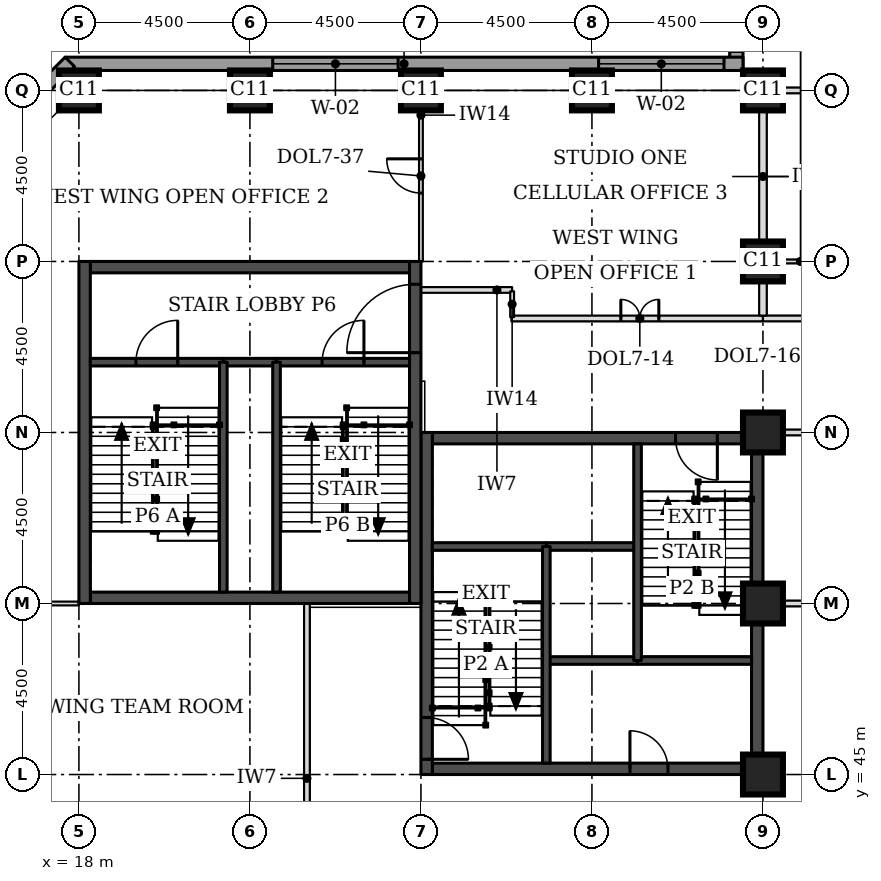
"""IFC4 building model, lengths in metres.
Left out: names, types, materials, properties, quantities, classifications, styles, units other than length and angle.
Written with IfcOpenShell. Run it as: python <this file> out.ifc"""

import sys

from ifc_helpers import new_model, si_unit, direction, frame, frame_2d, origin, origin_2d, place, context, subcontext, project, spatial, rectangle, extrude, element, fill, save


model = new_model("IFC4")
c1 = context("Model", 3, precision=1e-05, world=origin(), true_north=direction((0.0, 1.0)))
c2 = subcontext(c1, "Body", "Model", "MODEL_VIEW")
j1 = project(units=[si_unit("LENGTHUNIT", "METRE"), si_unit("PLANEANGLEUNIT", "RADIAN")], contexts=[c1])
p1 = place(None, origin())
s1 = spatial("IfcSite", under=j1, at=p1, CompositionType="ELEMENT")
p2 = place(p1, origin())
s2 = spatial("IfcBuilding", under=s1, at=p2, CompositionType="ELEMENT")
p3 = place(p2, frame((0.0, 0.0, 127.0)))
s3 = spatial("IfcBuildingStorey", under=s2, at=p3, CompositionType="ELEMENT", Elevation=127.0)
for number, where, z_axis, x_axis in (
    (1, (36.0, 45.0, 0.0), (0.0, 0.0, 1.0), (1.0, 0.0, 0.0)),
    (2, (36.0, 49.5, 0.0), (0.0, 0.0, 1.0), (1.0, 0.0, 0.0)),
    (3, (36.0, 54.0, 0.0), (0.0, 0.0, 1.0), (1.0, 0.0, 0.0)),
    (4, (36.0, 58.5, 0.0), (0.0, 0.0, 1.0), (1.0, 0.0, 0.0)),
    (5, (18.0, 63.0, 0.0), (0.0, 0.0, 1.0), (1.0, 0.0, 0.0)),
    (6, (22.5, 63.0, 0.0), (0.0, 0.0, 1.0), (1.0, 0.0, 0.0)),
    (7, (27.0, 63.0, 0.0), (0.0, 0.0, 1.0), (1.0, 0.0, 0.0)),
    (8, (31.5, 63.0, 0.0), (0.0, 0.0, 1.0), (1.0, 0.0, 0.0)),
    (9, (36.0, 63.0, 0.0), (0.0, 0.0, 1.0), (1.0, 0.0, 0.0)),
):
    element("IfcColumn", number, at=place(p3, frame(where, z_axis=z_axis, x_axis=x_axis)), inside=s3, PredefinedType="COLUMN", context=c2, shape_type="SweptSolid", body=[
        extrude(rectangle(XDim=1.05, YDim=1.05, at=origin_2d()), origin(), (0.0, 0.0, 1.0), 3.7),
    ])
p4 = place(p3, frame((27.3, 45.15, 0.0), z_axis=(0.0, 0.0, 1.0), x_axis=(1.0, 0.0, 0.0)))
e10 = element("IfcWall", 10, at=p4, inside=s3, PredefinedType="SHEAR", context=c2, shape_type="SweptSolid", body=[
    extrude(rectangle(XDim=8.4, YDim=0.3, at=frame_2d((4.2, 0.0))), origin(), (0.0, 0.0, 1.0), 3.7),
])
p5 = place(p4, frame((5.2, 0.0, 0.0)))
e11 = element("IfcOpeningElement", 11, at=p5, cuts=e10, PredefinedType="OPENING", context=c2, shape_type="SweptSolid", body=[
    extrude(rectangle(XDim=1.0, YDim=2.1, at=frame_2d((0.5, 1.05))), frame((0.0, 0.16, 0.0), z_axis=(0.0, -1.0, 0.0), x_axis=(1.0, 0.0, 0.0)), (0.0, 0.0, 1.0), 0.32),
])
p6 = place(p3, frame((27.3, 53.85, 0.0), z_axis=(0.0, 0.0, 1.0), x_axis=(1.0, 0.0, 0.0)))
e12 = element("IfcWall", 12, at=p6, inside=s3, PredefinedType="SHEAR", context=c2, shape_type="SweptSolid", body=[
    extrude(rectangle(XDim=8.4, YDim=0.3, at=frame_2d((4.2, 0.0))), origin(), (0.0, 0.0, 1.0), 3.7),
])
p7 = place(p6, frame((6.4, 0.0, 0.0)))
e13 = element("IfcOpeningElement", 13, at=p7, cuts=e12, PredefinedType="OPENING", context=c2, shape_type="SweptSolid", body=[
    extrude(rectangle(XDim=1.1, YDim=2.1, at=frame_2d((0.55, 1.05))), frame((0.0, 0.16, 0.0), z_axis=(0.0, -1.0, 0.0), x_axis=(1.0, 0.0, 0.0)), (0.0, 0.0, 1.0), 0.32),
])
p8 = place(p3, frame((27.15, 45.0, 0.0), z_axis=(0.0, 0.0, 1.0), x_axis=(0.0, 1.0, 0.0)))
e14 = element("IfcWall", 14, at=p8, inside=s3, PredefinedType="SHEAR", context=c2, shape_type="SweptSolid", body=[
    extrude(rectangle(XDim=9.0, YDim=0.3, at=frame_2d((4.5, 0.0))), origin(), (0.0, 0.0, 1.0), 3.7),
])
p9 = place(p8, frame((0.4, 0.0, 0.0)))
e15 = element("IfcOpeningElement", 15, at=p9, cuts=e14, PredefinedType="OPENING", context=c2, shape_type="SweptSolid", body=[
    extrude(rectangle(XDim=1.1, YDim=2.1, at=frame_2d((0.55, 1.05))), frame((0.0, 0.16, 0.0), z_axis=(0.0, -1.0, 0.0), x_axis=(1.0, 0.0, 0.0)), (0.0, 0.0, 1.0), 0.32),
])
p10 = place(p3, frame((35.85, 45.0, 0.0), z_axis=(0.0, 0.0, 1.0), x_axis=(0.0, 1.0, 0.0)))
e16 = element("IfcWall", 16, at=p10, inside=s3, PredefinedType="SHEAR", context=c2, shape_type="SweptSolid", body=[
    extrude(rectangle(XDim=9.0, YDim=0.3, at=frame_2d((4.5, 0.0))), origin(), (0.0, 0.0, 1.0), 3.7),
])
for number, where, z_axis, x_axis in (
    (17, (18.3, 49.65, 0.0), (0.0, 0.0, 1.0), (1.0, 0.0, 0.0)),
    (18, (18.3, 58.35, 0.0), (0.0, 0.0, 1.0), (1.0, 0.0, 0.0)),
):
    element("IfcWall", number, at=place(p3, frame(where, z_axis=z_axis, x_axis=x_axis)), inside=s3, PredefinedType="SHEAR", context=c2, shape_type="SweptSolid", body=[
        extrude(rectangle(XDim=8.4, YDim=0.3, at=frame_2d((4.2, 0.0))), origin(), (0.0, 0.0, 1.0), 3.7),
    ])
p11 = place(p3, frame((18.15, 49.5, 0.0), z_axis=(0.0, 0.0, 1.0), x_axis=(0.0, 1.0, 0.0)))
e19 = element("IfcWall", 19, at=p11, inside=s3, PredefinedType="SHEAR", context=c2, shape_type="SweptSolid", body=[
    extrude(rectangle(XDim=9.0, YDim=0.3, at=frame_2d((4.5, 0.0))), origin(), (0.0, 0.0, 1.0), 3.7),
])
p12 = place(p3, frame((26.85, 49.5, 0.0), z_axis=(0.0, 0.0, 1.0), x_axis=(0.0, 1.0, 0.0)))
e20 = element("IfcWall", 20, at=p12, inside=s3, PredefinedType="SHEAR", context=c2, shape_type="SweptSolid", body=[
    extrude(rectangle(XDim=9.0, YDim=0.3, at=frame_2d((4.5, 0.0))), origin(), (0.0, 0.0, 1.0), 3.7),
])
p13 = place(p12, frame((6.6, 0.0, 0.0)))
e21 = element("IfcOpeningElement", 21, at=p13, cuts=e20, PredefinedType="OPENING", context=c2, shape_type="SweptSolid", body=[
    extrude(rectangle(XDim=1.8, YDim=2.1, at=frame_2d((0.9, 1.05))), frame((0.0, 0.16, 0.0), z_axis=(0.0, -1.0, 0.0), x_axis=(1.0, 0.0, 0.0)), (0.0, 0.0, 1.0), 0.32),
])
p14 = place(p3, frame((35.3, 76.862, 0.0), z_axis=(0.0, 0.0, 1.0), x_axis=(0.0, -1.0, 0.0)))
e22 = element("IfcWall", 22, at=p14, inside=s3, PredefinedType="STANDARD", context=c2, shape_type="SweptSolid", body=[
    extrude(rectangle(XDim=13.337, YDim=0.35, at=frame_2d((6.669, 0.0))), origin(), (0.0, 0.0, 1.0), 3.525),
])
p15 = place(p14, frame((9.537, 0.0, 0.9)))
e23 = element("IfcOpeningElement", 23, at=p15, cuts=e22, PredefinedType="OPENING", context=c2, shape_type="SweptSolid", body=[
    extrude(rectangle(XDim=3.3, YDim=1.9, at=frame_2d((1.65, 0.95))), frame((0.0, 0.185, 0.0), z_axis=(0.0, -1.0, 0.0), x_axis=(1.0, 0.0, 0.0)), (0.0, 0.0, 1.0), 0.37),
])
p16 = place(p3, frame((35.475, 63.7, 0.0), z_axis=(0.0, 0.0, 1.0), x_axis=(-1.0, 0.0, 0.0)))
e24 = element("IfcWall", 24, at=p16, inside=s3, PredefinedType="STANDARD", context=c2, shape_type="SweptSolid", body=[
    extrude(rectangle(XDim=17.837, YDim=0.35, at=frame_2d((8.919, 0.0))), origin(), (0.0, 0.0, 1.0), 3.525),
])
p17 = place(p16, frame((0.5, 0.0, 0.9)))
e25 = element("IfcOpeningElement", 25, at=p17, cuts=e24, PredefinedType="OPENING", context=c2, shape_type="SweptSolid", body=[
    extrude(rectangle(XDim=3.3, YDim=1.9, at=frame_2d((1.65, 0.95))), frame((0.0, 0.185, 0.0), z_axis=(0.0, -1.0, 0.0), x_axis=(1.0, 0.0, 0.0)), (0.0, 0.0, 1.0), 0.37),
])
p18 = place(p16, frame((9.075, 0.0, 0.9)))
e26 = element("IfcOpeningElement", 26, at=p18, cuts=e24, PredefinedType="OPENING", context=c2, shape_type="SweptSolid", body=[
    extrude(rectangle(XDim=3.3, YDim=1.9, at=frame_2d((1.65, 0.95))), frame((0.0, 0.185, 0.0), z_axis=(0.0, -1.0, 0.0), x_axis=(1.0, 0.0, 0.0)), (0.0, 0.0, 1.0), 0.37),
])
p19 = place(p3, frame((17.761, 63.751, 0.0), z_axis=(0.0, 0.0, 1.0), x_axis=(-0.707106781187, -0.707106781187, 0.0)))
e27 = element("IfcWall", 27, at=p19, inside=s3, PredefinedType="STANDARD", context=c2, shape_type="SweptSolid", body=[
    extrude(rectangle(XDim=7.089, YDim=0.35, at=frame_2d((3.544, 0.0))), origin(), (0.0, 0.0, 1.0), 3.525),
])
p20 = place(p19, frame((1.894, 0.0, 0.9)))
e28 = element("IfcOpeningElement", 28, at=p20, cuts=e27, PredefinedType="OPENING", context=c2, shape_type="SweptSolid", body=[
    extrude(rectangle(XDim=3.3, YDim=1.9, at=frame_2d((1.65, 0.95))), frame((0.0, 0.185, 0.0), z_axis=(0.0, -1.0, 0.0), x_axis=(1.0, 0.0, 0.0)), (0.0, 0.0, 1.0), 0.37),
])
p21 = place(p3, frame((12.749, 44.761, 0.0), z_axis=(0.0, 0.0, 1.0), x_axis=(0.707106781187, -0.707106781187, 0.0)))
e29 = element("IfcWall", 29, at=p21, inside=s3, PredefinedType="STANDARD", context=c2, shape_type="SweptSolid", body=[
    extrude(rectangle(XDim=7.089, YDim=0.35, at=frame_2d((3.544, 0.0))), origin(), (0.0, 0.0, 1.0), 3.525),
])
p22 = place(p21, frame((1.894, 0.0, 0.9)))
e30 = element("IfcOpeningElement", 30, at=p22, cuts=e29, PredefinedType="OPENING", context=c2, shape_type="SweptSolid", body=[
    extrude(rectangle(XDim=3.3, YDim=1.9, at=frame_2d((1.65, 0.95))), frame((0.0, 0.185, 0.0), z_axis=(0.0, -1.0, 0.0), x_axis=(1.0, 0.0, 0.0)), (0.0, 0.0, 1.0), 0.37),
])
for number, where, z_axis, x_axis in (
    (31, (36.525, 49.5, 0.0), (0.0, 0.0, 1.0), (1.0, 0.0, 0.0)),
    (32, (36.525, 54.0, 0.0), (0.0, 0.0, 1.0), (1.0, 0.0, 0.0)),
):
    element("IfcWall", number, at=place(p3, frame(where, z_axis=z_axis, x_axis=x_axis)), inside=s3, PredefinedType="PARTITIONING", context=c2, shape_type="SweptSolid", body=[
        extrude(rectangle(XDim=5.55, YDim=0.15, at=frame_2d((2.775, 0.0))), origin(), (0.0, 0.0, 1.0), 3.55),
    ])
p23 = place(p3, frame((29.38, 57.0, 0.0), z_axis=(0.0, 0.0, 1.0), x_axis=(1.0, 0.0, 0.0)))
e33 = element("IfcWall", 33, at=p23, inside=s3, PredefinedType="PARTITIONING", context=c2, shape_type="SweptSolid", body=[
    extrude(rectangle(XDim=6.62, YDim=0.15, at=frame_2d((3.31, 0.0))), origin(), (0.0, 0.0, 1.0), 3.55),
])
p24 = place(p23, frame((2.88, 0.0, 0.0)))
e34 = element("IfcOpeningElement", 34, at=p24, cuts=e33, PredefinedType="OPENING", context=c2, shape_type="SweptSolid", body=[
    extrude(rectangle(XDim=1.0, YDim=2.1, at=frame_2d((0.5, 1.05))), frame((0.0, 0.085, 0.0), z_axis=(0.0, -1.0, 0.0), x_axis=(1.0, 0.0, 0.0)), (0.0, 0.0, 1.0), 0.17),
])
p25 = place(p3, frame((36.0, 57.0, 0.0), z_axis=(0.0, 0.0, 1.0), x_axis=(1.0, 0.0, 0.0)))
e35 = element("IfcWall", 35, at=p25, inside=s3, PredefinedType="PARTITIONING", context=c2, shape_type="SweptSolid", body=[
    extrude(rectangle(XDim=6.075, YDim=0.15, at=frame_2d((3.038, 0.0))), origin(), (0.0, 0.0, 1.0), 3.55),
])
p26 = place(p25, frame((2.55, 0.0, 0.0)))
e36 = element("IfcOpeningElement", 36, at=p26, cuts=e35, PredefinedType="OPENING", context=c2, shape_type="SweptSolid", body=[
    extrude(rectangle(XDim=1.0, YDim=2.1, at=frame_2d((0.5, 1.05))), frame((0.0, 0.085, 0.0), z_axis=(0.0, -1.0, 0.0), x_axis=(1.0, 0.0, 0.0)), (0.0, 0.0, 1.0), 0.17),
])
p27 = place(p3, frame((36.525, 58.5, 0.0), z_axis=(0.0, 0.0, 1.0), x_axis=(1.0, 0.0, 0.0)))
e37 = element("IfcWall", 37, at=p27, inside=s3, PredefinedType="PARTITIONING", context=c2, shape_type="SweptSolid", body=[
    extrude(rectangle(XDim=2.525, YDim=0.1, at=frame_2d((1.263, 0.0))), origin(), (0.0, 0.0, 1.0), 3.55),
])
p28 = place(p27, frame((0.8, 0.0, 0.0)))
e38 = element("IfcOpeningElement", 38, at=p28, cuts=e37, PredefinedType="OPENING", context=c2, shape_type="SweptSolid", body=[
    extrude(rectangle(XDim=0.9, YDim=2.1, at=frame_2d((0.45, 1.05))), frame((0.0, 0.06, 0.0), z_axis=(0.0, -1.0, 0.0), x_axis=(1.0, 0.0, 0.0)), (0.0, 0.0, 1.0), 0.12),
])
p29 = place(p3, frame((36.525, 63.0, 0.0), z_axis=(0.0, 0.0, 1.0), x_axis=(1.0, 0.0, 0.0)))
e39 = element("IfcWall", 39, at=p29, inside=s3, PredefinedType="PARTITIONING", context=c2, shape_type="SweptSolid", body=[
    extrude(rectangle(XDim=2.4, YDim=0.15, at=frame_2d((1.2, 0.0))), origin(), (0.0, 0.0, 1.0), 3.55),
])
p30 = place(p3, frame((24.0, 43.5, 0.0), z_axis=(0.0, 0.0, 1.0), x_axis=(0.0, 1.0, 0.0)))
e40 = element("IfcWall", 40, at=p30, inside=s3, PredefinedType="PARTITIONING", context=c2, shape_type="SweptSolid", body=[
    extrude(rectangle(XDim=6.0, YDim=0.15, at=frame_2d((3.0, 0.0))), origin(), (0.0, 0.0, 1.0), 3.55),
])
p31 = place(p3, frame((36.0, 57.075, 0.0), z_axis=(0.0, 0.0, 1.0), x_axis=(0.0, 1.0, 0.0)))
e41 = element("IfcWall", 41, at=p31, inside=s3, PredefinedType="PARTITIONING", context=c2, shape_type="SweptSolid", body=[
    extrude(rectangle(XDim=0.9, YDim=0.2, at=frame_2d((0.45, 0.0))), origin(), (0.0, 0.0, 1.0), 2.8),
])
p32 = place(p3, frame((36.0, 58.995, 0.0), z_axis=(0.0, 0.0, 1.0), x_axis=(0.0, 1.0, 0.0)))
e42 = element("IfcWall", 42, at=p32, inside=s3, PredefinedType="PARTITIONING", context=c2, shape_type="SweptSolid", body=[
    extrude(rectangle(XDim=3.48, YDim=0.2, at=frame_2d((1.74, 0.0))), origin(), (0.0, 0.0, 1.0), 2.8),
])
p33 = place(p3, frame((27.0, 63.0, 0.0), z_axis=(0.0, 0.0, 1.0), x_axis=(0.0, -1.0, 0.0)))
e43 = element("IfcWall", 43, at=p33, inside=s3, PredefinedType="PARTITIONING", context=c2, shape_type="SweptSolid", body=[
    extrude(rectangle(XDim=4.5, YDim=0.1, at=frame_2d((2.25, 0.0))), origin(), (0.0, 0.0, 1.0), 3.55),
])
p34 = place(p33, frame((1.8, 0.0, 0.0)))
e44 = element("IfcOpeningElement", 44, at=p34, cuts=e43, PredefinedType="OPENING", context=c2, shape_type="SweptSolid", body=[
    extrude(rectangle(XDim=0.9, YDim=2.1, at=frame_2d((0.45, 1.05))), frame((0.0, 0.06, 0.0), z_axis=(0.0, -1.0, 0.0), x_axis=(1.0, 0.0, 0.0)), (0.0, 0.0, 1.0), 0.12),
])
p35 = place(p3, frame((13.5, 49.5, 0.0), z_axis=(0.0, 0.0, 1.0), x_axis=(1.0, 0.0, 0.0)))
e45 = element("IfcWall", 45, at=p35, inside=s3, PredefinedType="PARTITIONING", context=c2, shape_type="SweptSolid", body=[
    extrude(rectangle(XDim=4.5, YDim=0.1, at=frame_2d((2.25, 0.0))), origin(), (0.0, 0.0, 1.0), 3.55),
])
p36 = place(p35, frame((1.8, 0.0, 0.0)))
e46 = element("IfcOpeningElement", 46, at=p36, cuts=e45, PredefinedType="OPENING", context=c2, shape_type="SweptSolid", body=[
    extrude(rectangle(XDim=0.9, YDim=2.1, at=frame_2d((0.45, 1.05))), frame((0.0, 0.06, 0.0), z_axis=(0.0, -1.0, 0.0), x_axis=(1.0, 0.0, 0.0)), (0.0, 0.0, 1.0), 0.12),
])
p37 = place(p3, frame((27.0, 57.75, 0.0), z_axis=(0.0, 0.0, 1.0), x_axis=(1.0, 0.0, 0.0)))
e47 = element("IfcWall", 47, at=p37, inside=s3, PredefinedType="PARTITIONING", context=c2, shape_type="SweptSolid", body=[
    extrude(rectangle(XDim=2.4, YDim=0.15, at=frame_2d((1.2, 0.0))), origin(), (0.0, 0.0, 1.0), 3.55),
])
p38 = place(p3, frame((29.4, 57.715, 0.0), z_axis=(0.0, 0.0, 1.0), x_axis=(0.0, -1.0, 0.0)))
e48 = element("IfcWall", 48, at=p38, inside=s3, PredefinedType="PARTITIONING", context=c2, shape_type="SweptSolid", body=[
    extrude(rectangle(XDim=0.68, YDim=0.1, at=frame_2d((0.34, 0.0))), origin(), (0.0, 0.0, 1.0), 3.55),
])
p39 = place(p3, frame((30.3, 48.0, 0.0), z_axis=(0.0, 0.0, 1.0), x_axis=(1.0, 0.0, 0.0)))
e49 = element("IfcWall", 49, at=p39, inside=s3, PredefinedType="SOLIDWALL", context=c2, shape_type="SweptSolid", body=[
    extrude(rectangle(XDim=2.4, YDim=0.2, at=frame_2d((1.2, 0.0))), origin(), (0.0, 0.0, 1.0), 3.55),
])
p40 = place(p3, frame((32.7, 48.0, 0.0), z_axis=(0.0, 0.0, 1.0), x_axis=(1.0, 0.0, 0.0)))
e50 = element("IfcWall", 50, at=p40, inside=s3, PredefinedType="SOLIDWALL", context=c2, shape_type="SweptSolid", body=[
    extrude(rectangle(XDim=3.0, YDim=0.2, at=frame_2d((1.5, 0.0))), origin(), (0.0, 0.0, 1.0), 3.55),
])
p41 = place(p3, frame((30.3, 51.0, 0.0), z_axis=(0.0, 0.0, 1.0), x_axis=(1.0, 0.0, 0.0)))
e51 = element("IfcWall", 51, at=p41, inside=s3, PredefinedType="SOLIDWALL", context=c2, shape_type="SweptSolid", body=[
    extrude(rectangle(XDim=2.4, YDim=0.2, at=frame_2d((1.2, 0.0))), origin(), (0.0, 0.0, 1.0), 3.7),
])
p42 = place(p3, frame((27.3, 51.0, 0.0), z_axis=(0.0, 0.0, 1.0), x_axis=(1.0, 0.0, 0.0)))
e52 = element("IfcWall", 52, at=p42, inside=s3, PredefinedType="SOLIDWALL", context=c2, shape_type="SweptSolid", body=[
    extrude(rectangle(XDim=3.0, YDim=0.2, at=frame_2d((1.5, 0.0))), origin(), (0.0, 0.0, 1.0), 3.55),
])
for number, where, z_axis, x_axis in (
    (53, (30.3, 45.3, 0.0), (0.0, 0.0, 1.0), (0.0, 1.0, 0.0)),
    (54, (32.7, 48.0, 0.0), (0.0, 0.0, 1.0), (0.0, 1.0, 0.0)),
):
    element("IfcWall", number, at=place(p3, frame(where, z_axis=z_axis, x_axis=x_axis)), inside=s3, PredefinedType="SOLIDWALL", context=c2, shape_type="SweptSolid", body=[
        extrude(rectangle(XDim=5.7, YDim=0.2, at=frame_2d((2.85, 0.0))), origin(), (0.0, 0.0, 1.0), 3.55),
    ])
p43 = place(p3, frame((21.8, 55.85, 0.0), z_axis=(0.0, 0.0, 1.0), x_axis=(1.0, 0.0, 0.0)))
e55 = element("IfcWall", 55, at=p43, inside=s3, PredefinedType="SOLIDWALL", context=c2, shape_type="SweptSolid", body=[
    extrude(rectangle(XDim=1.4, YDim=0.2, at=frame_2d((0.7, 0.0))), origin(), (0.0, 0.0, 1.0), 3.55),
])
p44 = place(p3, frame((18.3, 55.85, 0.0), z_axis=(0.0, 0.0, 1.0), x_axis=(1.0, 0.0, 0.0)))
e56 = element("IfcWall", 56, at=p44, inside=s3, PredefinedType="SOLIDWALL", context=c2, shape_type="SweptSolid", body=[
    extrude(rectangle(XDim=3.5, YDim=0.2, at=frame_2d((1.75, 0.0))), origin(), (0.0, 0.0, 1.0), 3.55),
])
p45 = place(p44, frame((1.2, 0.0, 0.0)))
e57 = element("IfcOpeningElement", 57, at=p45, cuts=e56, PredefinedType="OPENING", context=c2, shape_type="SweptSolid", body=[
    extrude(rectangle(XDim=1.1, YDim=2.1, at=frame_2d((0.55, 1.05))), frame((0.0, 0.11, 0.0), z_axis=(0.0, -1.0, 0.0), x_axis=(1.0, 0.0, 0.0)), (0.0, 0.0, 1.0), 0.22),
])
p46 = place(p3, frame((23.2, 55.85, 0.0), z_axis=(0.0, 0.0, 1.0), x_axis=(1.0, 0.0, 0.0)))
e58 = element("IfcWall", 58, at=p46, inside=s3, PredefinedType="SOLIDWALL", context=c2, shape_type="SweptSolid", body=[
    extrude(rectangle(XDim=3.5, YDim=0.2, at=frame_2d((1.75, 0.0))), origin(), (0.0, 0.0, 1.0), 3.55),
])
p47 = place(p46, frame((1.2, 0.0, 0.0)))
e59 = element("IfcOpeningElement", 59, at=p47, cuts=e58, PredefinedType="OPENING", context=c2, shape_type="SweptSolid", body=[
    extrude(rectangle(XDim=1.1, YDim=2.1, at=frame_2d((0.55, 1.05))), frame((0.0, 0.11, 0.0), z_axis=(0.0, -1.0, 0.0), x_axis=(1.0, 0.0, 0.0)), (0.0, 0.0, 1.0), 0.22),
])
for number, where, z_axis, x_axis in (
    (60, (21.8, 49.8, 0.0), (0.0, 0.0, 1.0), (0.0, 1.0, 0.0)),
    (61, (23.2, 49.8, 0.0), (0.0, 0.0, 1.0), (0.0, 1.0, 0.0)),
):
    element("IfcWall", number, at=place(p3, frame(where, z_axis=z_axis, x_axis=x_axis)), inside=s3, PredefinedType="SOLIDWALL", context=c2, shape_type="SweptSolid", body=[
        extrude(rectangle(XDim=6.05, YDim=0.2, at=frame_2d((3.025, 0.0))), origin(), (0.0, 0.0, 1.0), 3.55),
    ])
p48 = place(p17, origin())
e62 = element("IfcWindow", 62, at=p48, inside=s3, PartitioningType="SINGLE_PANEL", PredefinedType="WINDOW", context=c2, shape_type="SweptSolid", body=[
    extrude(rectangle(XDim=3.3, YDim=1.9, at=frame_2d((1.65, 0.95))), frame((0.0, 0.085, 0.0), z_axis=(0.0, -1.0, 0.0), x_axis=(1.0, 0.0, 0.0)), (0.0, 0.0, 1.0), 0.06),
])
fill(e25, e62)
p49 = place(p18, origin())
e63 = element("IfcWindow", 63, at=p49, inside=s3, PartitioningType="SINGLE_PANEL", PredefinedType="WINDOW", context=c2, shape_type="SweptSolid", body=[
    extrude(rectangle(XDim=3.3, YDim=1.9, at=frame_2d((1.65, 0.95))), frame((0.0, 0.085, 0.0), z_axis=(0.0, -1.0, 0.0), x_axis=(1.0, 0.0, 0.0)), (0.0, 0.0, 1.0), 0.06),
])
fill(e26, e63)
p50 = place(p24, origin())
e64 = element("IfcDoor", 64, at=p50, inside=s3, OperationType="DOUBLE_DOOR_SINGLE_SWING", PredefinedType="DOOR", context=c2, shape_type="SweptSolid", body=[
    extrude(rectangle(XDim=1.0, YDim=2.1, at=frame_2d((0.5, 1.05))), frame((0.0, 0.025, 0.0), z_axis=(0.0, -1.0, 0.0), x_axis=(1.0, 0.0, 0.0)), (0.0, 0.0, 1.0), 0.05),
])
fill(e34, e64)
p51 = place(p34, frame((0.9, 0.0, 0.0), z_axis=(0.0, 0.0, 1.0), x_axis=(-1.0, 0.0, 0.0)))
e65 = element("IfcDoor", 65, at=p51, inside=s3, OperationType="SINGLE_SWING_RIGHT", PredefinedType="DOOR", context=c2, shape_type="SweptSolid", body=[
    extrude(rectangle(XDim=0.9, YDim=2.1, at=frame_2d((0.45, 1.05))), frame((0.0, 0.025, 0.0), z_axis=(0.0, -1.0, 0.0), x_axis=(1.0, 0.0, 0.0)), (0.0, 0.0, 1.0), 0.05),
])
fill(e44, e65)
p52 = place(p9, frame((1.1, 0.0, 0.0), z_axis=(0.0, 0.0, 1.0), x_axis=(-1.0, 0.0, 0.0)))
e66 = element("IfcDoor", 66, at=p52, inside=s3, OperationType="SINGLE_SWING_RIGHT", PredefinedType="DOOR", context=c2, shape_type="SweptSolid", body=[
    extrude(rectangle(XDim=1.1, YDim=2.1, at=frame_2d((0.55, 1.05))), frame((0.0, 0.025, 0.0), z_axis=(0.0, -1.0, 0.0), x_axis=(1.0, 0.0, 0.0)), (0.0, 0.0, 1.0), 0.05),
])
fill(e15, e66)
p53 = place(p7, frame((1.1, 0.0, 0.0), z_axis=(0.0, 0.0, 1.0), x_axis=(-1.0, 0.0, 0.0)))
e67 = element("IfcDoor", 67, at=p53, inside=s3, OperationType="SINGLE_SWING_LEFT", PredefinedType="DOOR", context=c2, shape_type="SweptSolid", body=[
    extrude(rectangle(XDim=1.1, YDim=2.1, at=frame_2d((0.55, 1.05))), frame((0.0, 0.025, 0.0), z_axis=(0.0, -1.0, 0.0), x_axis=(1.0, 0.0, 0.0)), (0.0, 0.0, 1.0), 0.05),
])
fill(e13, e67)
p54 = place(p5, origin())
e68 = element("IfcDoor", 68, at=p54, inside=s3, OperationType="SINGLE_SWING_LEFT", PredefinedType="DOOR", context=c2, shape_type="SweptSolid", body=[
    extrude(rectangle(XDim=1.0, YDim=2.1, at=frame_2d((0.5, 1.05))), frame((0.0, 0.025, 0.0), z_axis=(0.0, -1.0, 0.0), x_axis=(1.0, 0.0, 0.0)), (0.0, 0.0, 1.0), 0.05),
])
fill(e11, e68)
p55 = place(p45, origin())
e69 = element("IfcDoor", 69, at=p55, inside=s3, OperationType="SINGLE_SWING_RIGHT", PredefinedType="DOOR", context=c2, shape_type="SweptSolid", body=[
    extrude(rectangle(XDim=1.1, YDim=2.1, at=frame_2d((0.55, 1.05))), frame((0.0, 0.025, 0.0), z_axis=(0.0, -1.0, 0.0), x_axis=(1.0, 0.0, 0.0)), (0.0, 0.0, 1.0), 0.05),
])
fill(e57, e69)
p56 = place(p47, origin())
e70 = element("IfcDoor", 70, at=p56, inside=s3, OperationType="SINGLE_SWING_RIGHT", PredefinedType="DOOR", context=c2, shape_type="SweptSolid", body=[
    extrude(rectangle(XDim=1.1, YDim=2.1, at=frame_2d((0.55, 1.05))), frame((0.0, 0.025, 0.0), z_axis=(0.0, -1.0, 0.0), x_axis=(1.0, 0.0, 0.0)), (0.0, 0.0, 1.0), 0.05),
])
fill(e59, e70)
p57 = place(p13, origin())
e71 = element("IfcDoor", 71, at=p57, inside=s3, OperationType="SINGLE_SWING_LEFT", PredefinedType="DOOR", context=c2, shape_type="SweptSolid", body=[
    extrude(rectangle(XDim=1.8, YDim=2.1, at=frame_2d((0.9, 1.05))), frame((0.0, 0.025, 0.0), z_axis=(0.0, -1.0, 0.0), x_axis=(1.0, 0.0, 0.0)), (0.0, 0.0, 1.0), 0.05),
])
fill(e21, e71)
save(model, sys.argv[1])
